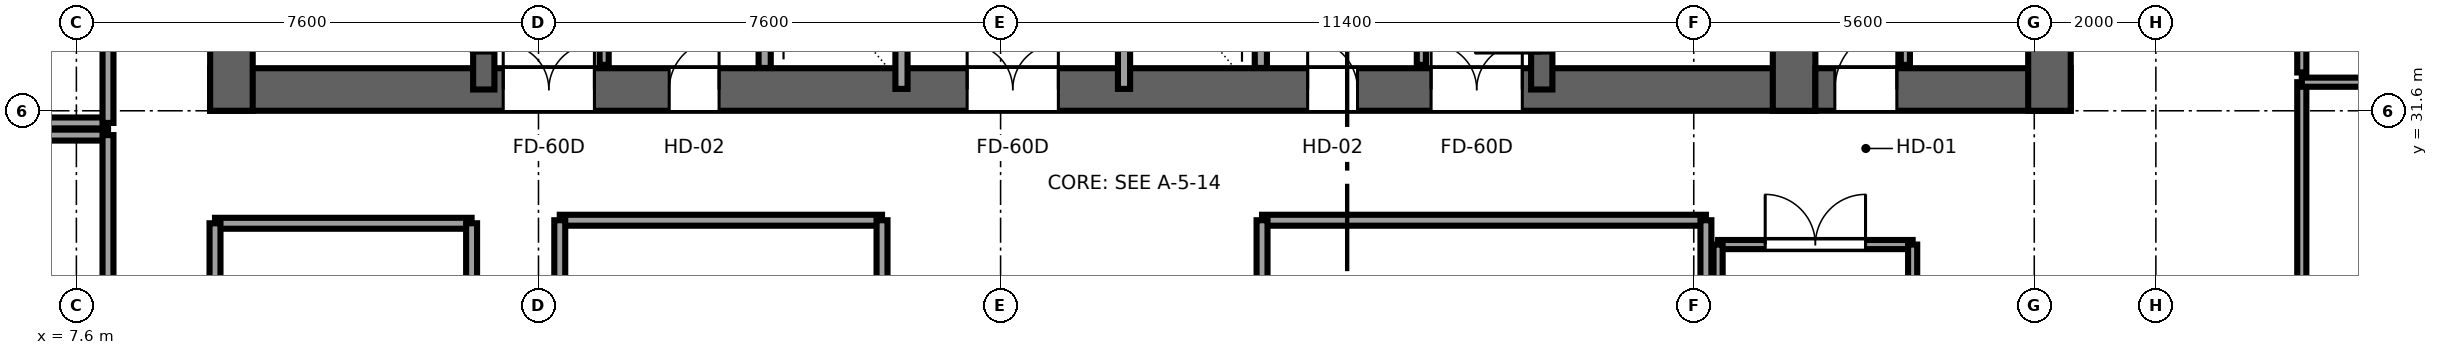
"""IFC4 building model, lengths in metres.
Left out: names, types, materials, properties, quantities, classifications, styles, units other than length and angle.
Written with IfcOpenShell. Run it as: python <this file> out.ifc"""

import sys

from ifc_helpers import new_model, si_unit, direction, frame, frame_2d, origin, place, context, subcontext, project, spatial, rectangle, extrude, source, transform, mapped, element, fill, save


model = new_model("IFC4")
c1 = context("Model", 3, precision=1e-05, world=origin(), true_north=direction((0.0, 1.0)))
c2 = subcontext(c1, "Body", "Model", "MODEL_VIEW")
j1 = project(units=[si_unit("LENGTHUNIT", "METRE"), si_unit("PLANEANGLEUNIT", "RADIAN")], contexts=[c1])
p1 = place(None, origin())
s1 = spatial("IfcSite", under=j1, at=p1, CompositionType="ELEMENT")
p2 = place(p1, origin())
s2 = spatial("IfcBuilding", under=s1, at=p2, CompositionType="ELEMENT")
p3 = place(p2, frame((0.0, 0.0, 201.75)))
s3 = spatial("IfcBuildingStorey", under=s2, at=p3, CompositionType="ELEMENT", Elevation=201.75)
p4 = place(p3, frame((9.8, 31.95, 0.0), z_axis=(0.0, 0.0, 1.0), x_axis=(1.0, 0.0, 0.0)))
e1 = element("IfcWall", 1, at=p4, inside=s3, PredefinedType="SHEAR", context=c2, shape_type="SweptSolid", body=[
    extrude(rectangle(XDim=26.4, YDim=0.7, at=frame_2d((13.2, 0.0))), origin(), (0.0, 0.0, 1.0), 3.55),
])
p5 = place(p4, frame((6.32, 0.0, 0.0), z_axis=(0.0, 0.0, 1.0), x_axis=(-1.0, 0.0, 0.0)))
e2 = element("IfcOpeningElement", 2, at=p5, cuts=e1, PredefinedType="OPENING", context=c2, shape_type="SweptSolid", body=[
    extrude(rectangle(XDim=1.5, YDim=2.04, at=frame_2d((0.75, 1.02))), frame((0.0, 0.36, 0.0), z_axis=(0.0, -1.0, 0.0), x_axis=(1.0, 0.0, 0.0)), (0.0, 0.0, 1.0), 0.72),
])
p6 = place(p4, frame((13.95, 0.0, 0.0), z_axis=(0.0, 0.0, 1.0), x_axis=(-1.0, 0.0, 0.0)))
e3 = element("IfcOpeningElement", 3, at=p6, cuts=e1, PredefinedType="OPENING", context=c2, shape_type="SweptSolid", body=[
    extrude(rectangle(XDim=1.5, YDim=2.04, at=frame_2d((0.75, 1.02))), frame((0.0, 0.36, 0.0), z_axis=(0.0, -1.0, 0.0), x_axis=(1.0, 0.0, 0.0)), (0.0, 0.0, 1.0), 0.72),
])
p7 = place(p4, frame((21.58, 0.0, 0.0), z_axis=(0.0, 0.0, 1.0), x_axis=(-1.0, 0.0, 0.0)))
e4 = element("IfcOpeningElement", 4, at=p7, cuts=e1, PredefinedType="OPENING", context=c2, shape_type="SweptSolid", body=[
    extrude(rectangle(XDim=1.5, YDim=2.04, at=frame_2d((0.75, 1.02))), frame((0.0, 0.36, 0.0), z_axis=(0.0, -1.0, 0.0), x_axis=(1.0, 0.0, 0.0)), (0.0, 0.0, 1.0), 0.72),
])
p8 = place(p4, frame((8.37, 0.0, 0.0), z_axis=(0.0, 0.0, 1.0), x_axis=(-1.0, 0.0, 0.0)))
e5 = element("IfcOpeningElement", 5, at=p8, cuts=e1, PredefinedType="OPENING", context=c2, shape_type="SweptSolid", body=[
    extrude(rectangle(XDim=0.82, YDim=2.01, at=frame_2d((0.41, 1.005))), frame((0.0, 0.36, 0.0), z_axis=(0.0, -1.0, 0.0), x_axis=(1.0, 0.0, 0.0)), (0.0, 0.0, 1.0), 0.72),
])
p9 = place(p4, frame((18.87, 0.0, 0.0), z_axis=(0.0, 0.0, 1.0), x_axis=(-1.0, 0.0, 0.0)))
e6 = element("IfcOpeningElement", 6, at=p9, cuts=e1, PredefinedType="OPENING", context=c2, shape_type="SweptSolid", body=[
    extrude(rectangle(XDim=0.82, YDim=2.01, at=frame_2d((0.41, 1.005))), frame((0.0, 0.36, 0.0), z_axis=(0.0, -1.0, 0.0), x_axis=(1.0, 0.0, 0.0)), (0.0, 0.0, 1.0), 0.72),
])
for number, where, z_axis, x_axis in (
    (7, (10.15, 31.6, 0.0), (0.0, 0.0, 1.0), (0.0, 1.0, 0.0)),
    (8, (35.85, 31.6, 0.0), (0.0, 0.0, 1.0), (0.0, 1.0, 0.0)),
):
    element("IfcWall", number, at=place(p3, frame(where, z_axis=z_axis, x_axis=x_axis)), inside=s3, PredefinedType="SHEAR", context=c2, shape_type="SweptSolid", body=[
        extrude(rectangle(XDim=13.6, YDim=0.7, at=frame_2d((6.8, 0.0))), origin(), (0.0, 0.0, 1.0), 3.55),
    ])
p10 = place(p3, frame((14.3, 31.95, 0.0), z_axis=(0.0, 0.0, 1.0), x_axis=(0.0, 1.0, 0.0)))
e9 = element("IfcWall", 9, at=p10, inside=s3, PredefinedType="SHEAR", context=c2, shape_type="SweptSolid", body=[
    extrude(rectangle(XDim=12.9, YDim=0.35, at=frame_2d((6.45, 0.0))), origin(), (0.0, 0.0, 1.0), 3.55),
])
p11 = place(p10, frame((0.6, 0.0, 0.0)))
e10 = element("IfcOpeningElement", 10, at=p11, cuts=e9, PredefinedType="OPENING", context=c2, shape_type="SweptSolid", body=[
    extrude(rectangle(XDim=1.1, YDim=2.12, at=frame_2d((0.55, 1.06))), frame((0.0, 0.185, 0.0), z_axis=(0.0, -1.0, 0.0), x_axis=(1.0, 0.0, 0.0)), (0.0, 0.0, 1.0), 0.37),
])
p12 = place(p3, frame((31.7, 31.95, 0.0), z_axis=(0.0, 0.0, 1.0), x_axis=(0.0, 1.0, 0.0)))
e11 = element("IfcWall", 11, at=p12, inside=s3, PredefinedType="SHEAR", context=c2, shape_type="SweptSolid", body=[
    extrude(rectangle(XDim=12.9, YDim=0.35, at=frame_2d((6.45, 0.0))), origin(), (0.0, 0.0, 1.0), 3.55),
])
p13 = place(p12, frame((1.7, 0.0, 0.0), z_axis=(0.0, 0.0, 1.0), x_axis=(-1.0, 0.0, 0.0)))
e12 = element("IfcOpeningElement", 12, at=p13, cuts=e11, PredefinedType="OPENING", context=c2, shape_type="SweptSolid", body=[
    extrude(rectangle(XDim=1.1, YDim=2.12, at=frame_2d((0.55, 1.06))), frame((0.0, 0.185, 0.0), z_axis=(0.0, -1.0, 0.0), x_axis=(1.0, 0.0, 0.0)), (0.0, 0.0, 1.0), 0.37),
])
p14 = place(p3, frame((36.2, 31.95, 0.0), z_axis=(0.0, 0.0, 1.0), x_axis=(1.0, 0.0, 0.0)))
e13 = element("IfcWall", 13, at=p14, inside=s3, PredefinedType="SHEAR", context=c2, shape_type="SweptSolid", body=[
    extrude(rectangle(XDim=4.2, YDim=0.7, at=frame_2d((2.1, 0.0))), origin(), (0.0, 0.0, 1.0), 3.55),
])
p15 = place(p14, frame((1.34, 0.0, 0.0), z_axis=(0.0, 0.0, 1.0), x_axis=(-1.0, 0.0, 0.0)))
e14 = element("IfcOpeningElement", 14, at=p15, cuts=e13, PredefinedType="OPENING", context=c2, shape_type="SweptSolid", body=[
    extrude(rectangle(XDim=1.02, YDim=2.03, at=frame_2d((0.51, 1.015))), frame((0.0, 0.36, 0.0), z_axis=(0.0, -1.0, 0.0), x_axis=(1.0, 0.0, 0.0)), (0.0, 0.0, 1.0), 0.72),
])
p16 = place(p3, frame((40.05, 31.6, 0.0), z_axis=(0.0, 0.0, 1.0), x_axis=(0.0, 1.0, 0.0)))
e15 = element("IfcWall", 15, at=p16, inside=s3, PredefinedType="SHEAR", context=c2, shape_type="SweptSolid", body=[
    extrude(rectangle(XDim=13.6, YDim=0.7, at=frame_2d((6.8, 0.0))), origin(), (0.0, 0.0, 1.0), 3.55),
])
for number, where, z_axis, x_axis in (
    (16, (18.92, 32.304, 0.0), (0.0, 0.0, 1.0), (0.0, 1.0, 0.0)),
    (17, (27.08, 32.304, 0.0), (0.0, 0.0, 1.0), (0.0, 1.0, 0.0)),
):
    element("IfcWall", number, at=place(p3, frame(where, z_axis=z_axis, x_axis=x_axis)), inside=s3, PredefinedType="SOLIDWALL", context=c2, shape_type="SweptSolid", body=[
        extrude(rectangle(XDim=3.846, YDim=0.2, at=frame_2d((1.923, 0.0))), origin(), (0.0, 0.0, 1.0), 3.29),
    ])
p17 = place(p3, frame((21.17, 31.96, 0.0), z_axis=(0.0, 0.0, 1.0), x_axis=(0.0, 1.0, 0.0)))
e18 = element("IfcWall", 18, at=p17, inside=s3, PredefinedType="SOLIDWALL", context=c2, shape_type="SweptSolid", body=[
    extrude(rectangle(XDim=12.58, YDim=0.2, at=frame_2d((6.29, 0.0))), origin(), (0.0, 0.0, 1.0), 3.29),
])
p18 = place(p17, frame((5.74, 0.0, 0.0)))
e19 = element("IfcOpeningElement", 19, at=p18, cuts=e18, PredefinedType="OPENING", context=c2, shape_type="SweptSolid", body=[
    extrude(rectangle(XDim=1.1, YDim=2.12, at=frame_2d((0.55, 1.06))), frame((0.0, 0.11, 0.0), z_axis=(0.0, -1.0, 0.0), x_axis=(1.0, 0.0, 0.0)), (0.0, 0.0, 1.0), 0.22),
])
p19 = place(p17, frame((8.24, 0.0, 0.0)))
e20 = element("IfcOpeningElement", 20, at=p19, cuts=e18, PredefinedType="OPENING", context=c2, shape_type="SweptSolid", body=[
    extrude(rectangle(XDim=1.1, YDim=2.12, at=frame_2d((0.55, 1.06))), frame((0.0, 0.11, 0.0), z_axis=(0.0, -1.0, 0.0), x_axis=(1.0, 0.0, 0.0)), (0.0, 0.0, 1.0), 0.22),
])
p20 = place(p3, frame((24.83, 31.96, 0.0), z_axis=(0.0, 0.0, 1.0), x_axis=(0.0, 1.0, 0.0)))
e21 = element("IfcWall", 21, at=p20, inside=s3, PredefinedType="SOLIDWALL", context=c2, shape_type="SweptSolid", body=[
    extrude(rectangle(XDim=12.58, YDim=0.2, at=frame_2d((6.29, 0.0))), origin(), (0.0, 0.0, 1.0), 3.29),
])
p21 = place(p20, frame((5.74, 0.0, 0.0)))
e22 = element("IfcOpeningElement", 22, at=p21, cuts=e21, PredefinedType="OPENING", context=c2, shape_type="SweptSolid", body=[
    extrude(rectangle(XDim=1.1, YDim=2.12, at=frame_2d((0.55, 1.06))), frame((0.0, 0.11, 0.0), z_axis=(0.0, -1.0, 0.0), x_axis=(1.0, 0.0, 0.0)), (0.0, 0.0, 1.0), 0.22),
])
p22 = place(p20, frame((8.24, 0.0, 0.0)))
e23 = element("IfcOpeningElement", 23, at=p22, cuts=e21, PredefinedType="OPENING", context=c2, shape_type="SweptSolid", body=[
    extrude(rectangle(XDim=1.1, YDim=2.12, at=frame_2d((0.55, 1.06))), frame((0.0, 0.11, 0.0), z_axis=(0.0, -1.0, 0.0), x_axis=(1.0, 0.0, 0.0)), (0.0, 0.0, 1.0), 0.22),
])
for number, where, z_axis, x_axis in (
    (24, (16.28, 32.355, 0.0), (0.0, 0.0, 1.0), (0.0, 1.0, 0.0)),
    (25, (29.72, 32.355, 0.0), (0.0, 0.0, 1.0), (0.0, 1.0, 0.0)),
):
    element("IfcWall", number, at=place(p3, frame(where, z_axis=z_axis, x_axis=x_axis)), inside=s3, PredefinedType="PARTITIONING", context=c2, shape_type="SweptSolid", body=[
        extrude(rectangle(XDim=0.865, YDim=0.15, at=frame_2d((0.433, 0.0))), origin(), (0.0, 0.0, 1.0), 3.29),
    ])
p23 = place(p3, frame((37.68, 32.355, 0.0), z_axis=(0.0, 0.0, 1.0), x_axis=(0.0, 1.0, 0.0)))
e26 = element("IfcWall", 26, at=p23, inside=s3, PredefinedType="PARTITIONING", context=c2, shape_type="SweptSolid", body=[
    extrude(rectangle(XDim=7.845, YDim=0.15, at=frame_2d((3.922, 0.0))), origin(), (0.0, 0.0, 1.0), 3.29),
])
p24 = place(p23, frame((3.413, 0.0, 0.0)))
e27 = element("IfcOpeningElement", 27, at=p24, cuts=e26, PredefinedType="OPENING", context=c2, shape_type="SweptSolid", body=[
    extrude(rectangle(XDim=1.02, YDim=2.03, at=frame_2d((0.51, 1.015))), frame((0.0, 0.085, 0.0), z_axis=(0.0, -1.0, 0.0), x_axis=(1.0, 0.0, 0.0)), (0.0, 0.0, 1.0), 0.17),
])
p25 = place(p3, frame((3.005, 31.2, 0.0), z_axis=(0.0, 0.0, 1.0), x_axis=(1.0, 0.0, 0.0)))
e28 = element("IfcWall", 28, at=p25, inside=s3, PredefinedType="PARTITIONING", context=c2, shape_type="SweptSolid", body=[
    extrude(rectangle(XDim=5.115, YDim=0.18, at=frame_2d((2.558, 0.0))), origin(), (0.0, 0.0, 1.0), 3.29),
])
p26 = place(p3, frame((8.12, 23.7, 0.0), z_axis=(0.0, 0.0, 1.0), x_axis=(0.0, 1.0, 0.0)))
e29 = element("IfcWall", 29, at=p26, inside=s3, PredefinedType="PARTITIONING", context=c2, shape_type="SweptSolid", body=[
    extrude(rectangle(XDim=7.5, YDim=0.18, at=frame_2d((3.75, 0.0))), origin(), (0.0, 0.0, 1.0), 3.29),
])
p27 = place(p26, frame((2.925, 0.0, 0.0)))
e30 = element("IfcOpeningElement", 30, at=p27, cuts=e29, PredefinedType="OPENING", context=c2, shape_type="SweptSolid", body=[
    extrude(rectangle(XDim=1.65, YDim=2.15, at=frame_2d((0.825, 1.075))), frame((0.0, 0.1, 0.0), z_axis=(0.0, -1.0, 0.0), x_axis=(1.0, 0.0, 0.0)), (0.0, 0.0, 1.0), 0.2),
])
p28 = place(p3, frame((3.005, 31.4, 0.0), z_axis=(0.0, 0.0, 1.0), x_axis=(1.0, 0.0, 0.0)))
e31 = element("IfcWall", 31, at=p28, inside=s3, PredefinedType="PARTITIONING", context=c2, shape_type="SweptSolid", body=[
    extrude(rectangle(XDim=5.115, YDim=0.18, at=frame_2d((2.558, 0.0))), origin(), (0.0, 0.0, 1.0), 3.29),
])
p29 = place(p3, frame((8.12, 31.4, 0.0), z_axis=(0.0, 0.0, 1.0), x_axis=(0.0, 1.0, 0.0)))
e32 = element("IfcWall", 32, at=p29, inside=s3, PredefinedType="PARTITIONING", context=c2, shape_type="SweptSolid", body=[
    extrude(rectangle(XDim=6.8, YDim=0.18, at=frame_2d((3.4, 0.0))), origin(), (0.0, 0.0, 1.0), 3.29),
])
p30 = place(p29, frame((3.175, 0.0, 0.0)))
e33 = element("IfcOpeningElement", 33, at=p30, cuts=e32, PredefinedType="OPENING", context=c2, shape_type="SweptSolid", body=[
    extrude(rectangle(XDim=1.65, YDim=2.15, at=frame_2d((0.825, 1.075))), frame((0.0, 0.1, 0.0), z_axis=(0.0, -1.0, 0.0), x_axis=(1.0, 0.0, 0.0)), (0.0, 0.0, 1.0), 0.2),
])
p31 = place(p3, frame((44.2, 23.78, 0.0), z_axis=(0.0, 0.0, 1.0), x_axis=(0.0, 1.0, 0.0)))
e34 = element("IfcWall", 34, at=p31, inside=s3, PredefinedType="PARTITIONING", context=c2, shape_type="SweptSolid", body=[
    extrude(rectangle(XDim=8.29, YDim=0.15, at=frame_2d((4.145, 0.0))), origin(), (0.0, 0.0, 1.0), 3.29),
])
p32 = place(p31, frame((3.655, 0.0, 0.0)))
e35 = element("IfcOpeningElement", 35, at=p32, cuts=e34, PredefinedType="OPENING", context=c2, shape_type="SweptSolid", body=[
    extrude(rectangle(XDim=0.98, YDim=2.12, at=frame_2d((0.49, 1.06))), frame((0.0, 0.085, 0.0), z_axis=(0.0, -1.0, 0.0), x_axis=(1.0, 0.0, 0.0)), (0.0, 0.0, 1.0), 0.17),
])
p33 = place(p3, frame((44.2, 32.07, 0.0), z_axis=(0.0, 0.0, 1.0), x_axis=(1.0, 0.0, 0.0)))
e36 = element("IfcWall", 36, at=p33, inside=s3, PredefinedType="PARTITIONING", context=c2, shape_type="SweptSolid", body=[
    extrude(rectangle(XDim=7.43, YDim=0.15, at=frame_2d((3.715, 0.0))), origin(), (0.0, 0.0, 1.0), 3.29),
])
p34 = place(p3, frame((44.2, 32.23, 0.0), z_axis=(0.0, 0.0, 1.0), x_axis=(0.0, 1.0, 0.0)))
e37 = element("IfcWall", 37, at=p34, inside=s3, PredefinedType="PARTITIONING", context=c2, shape_type="SweptSolid", body=[
    extrude(rectangle(XDim=8.29, YDim=0.15, at=frame_2d((4.145, 0.0))), origin(), (0.0, 0.0, 1.0), 3.29),
])
p35 = place(p34, frame((3.655, 0.0, 0.0)))
e38 = element("IfcOpeningElement", 38, at=p35, cuts=e37, PredefinedType="OPENING", context=c2, shape_type="SweptSolid", body=[
    extrude(rectangle(XDim=0.98, YDim=2.12, at=frame_2d((0.49, 1.06))), frame((0.0, 0.085, 0.0), z_axis=(0.0, -1.0, 0.0), x_axis=(1.0, 0.0, 0.0)), (0.0, 0.0, 1.0), 0.17),
])
p36 = place(p3, frame((9.88, 29.75, 0.0), z_axis=(0.0, 0.0, 1.0), x_axis=(1.0, 0.0, 0.0)))
e39 = element("IfcWall", 39, at=p36, inside=s3, PredefinedType="PARTITIONING", context=c2, shape_type="SweptSolid", body=[
    extrude(rectangle(XDim=4.22, YDim=0.18, at=frame_2d((2.11, 0.0))), origin(), (0.0, 0.0, 1.0), 3.29),
])
for number, where, z_axis, x_axis in (
    (40, (9.88, 23.7, 0.0), (0.0, 0.0, 1.0), (0.0, 1.0, 0.0)),
    (41, (14.1, 23.7, 0.0), (0.0, 0.0, 1.0), (0.0, 1.0, 0.0)),
):
    element("IfcWall", number, at=place(p3, frame(where, z_axis=z_axis, x_axis=x_axis)), inside=s3, PredefinedType="PARTITIONING", context=c2, shape_type="SweptSolid", body=[
        extrude(rectangle(XDim=6.05, YDim=0.18, at=frame_2d((3.025, 0.0))), origin(), (0.0, 0.0, 1.0), 3.29),
    ])
p37 = place(p3, frame((27.1, 29.8, 0.0), z_axis=(0.0, 0.0, 1.0), x_axis=(1.0, 0.0, 0.0)))
e42 = element("IfcWall", 42, at=p37, inside=s3, PredefinedType="PARTITIONING", context=c2, shape_type="SweptSolid", body=[
    extrude(rectangle(XDim=7.3, YDim=0.18, at=frame_2d((3.65, 0.0))), origin(), (0.0, 0.0, 1.0), 3.29),
])
for number, where, z_axis, x_axis in (
    (43, (27.1, 23.7, 0.0), (0.0, 0.0, 1.0), (0.0, 1.0, 0.0)),
    (44, (34.4, 23.7, 0.0), (0.0, 0.0, 1.0), (0.0, 1.0, 0.0)),
):
    element("IfcWall", number, at=place(p3, frame(where, z_axis=z_axis, x_axis=x_axis)), inside=s3, PredefinedType="PARTITIONING", context=c2, shape_type="SweptSolid", body=[
        extrude(rectangle(XDim=6.1, YDim=0.18, at=frame_2d((3.05, 0.0))), origin(), (0.0, 0.0, 1.0), 3.29),
    ])
p38 = place(p3, frame((15.55, 29.8, 0.0), z_axis=(0.0, 0.0, 1.0), x_axis=(1.0, 0.0, 0.0)))
e45 = element("IfcWall", 45, at=p38, inside=s3, PredefinedType="PARTITIONING", context=c2, shape_type="SweptSolid", body=[
    extrude(rectangle(XDim=5.3, YDim=0.18, at=frame_2d((2.65, 0.0))), origin(), (0.0, 0.0, 1.0), 3.29),
])
for number, where, z_axis, x_axis in (
    (46, (15.55, 23.7, 0.0), (0.0, 0.0, 1.0), (0.0, 1.0, 0.0)),
    (47, (20.85, 23.7, 0.0), (0.0, 0.0, 1.0), (0.0, 1.0, 0.0)),
):
    element("IfcWall", number, at=place(p3, frame(where, z_axis=z_axis, x_axis=x_axis)), inside=s3, PredefinedType="PARTITIONING", context=c2, shape_type="SweptSolid", body=[
        extrude(rectangle(XDim=6.1, YDim=0.18, at=frame_2d((3.05, 0.0))), origin(), (0.0, 0.0, 1.0), 3.29),
    ])
p39 = place(p3, frame((34.6, 29.4, 0.0), z_axis=(0.0, 0.0, 1.0), x_axis=(1.0, 0.0, 0.0)))
e48 = element("IfcWall", 48, at=p39, inside=s3, PredefinedType="PARTITIONING", context=c2, shape_type="SweptSolid", body=[
    extrude(rectangle(XDim=3.2, YDim=0.15, at=frame_2d((1.6, 0.0))), origin(), (0.0, 0.0, 1.0), 3.29),
])
p40 = place(p39, frame((0.775, 0.0, 0.0)))
e49 = element("IfcOpeningElement", 49, at=p40, cuts=e48, PredefinedType="OPENING", context=c2, shape_type="SweptSolid", body=[
    extrude(rectangle(XDim=1.65, YDim=2.15, at=frame_2d((0.825, 1.075))), frame((0.0, 0.085, 0.0), z_axis=(0.0, -1.0, 0.0), x_axis=(1.0, 0.0, 0.0)), (0.0, 0.0, 1.0), 0.17),
])
for number, where, z_axis, x_axis in (
    (50, (34.6, 23.7, 0.0), (0.0, 0.0, 1.0), (0.0, 1.0, 0.0)),
    (51, (37.8, 23.7, 0.0), (0.0, 0.0, 1.0), (0.0, 1.0, 0.0)),
):
    element("IfcWall", number, at=place(p3, frame(where, z_axis=z_axis, x_axis=x_axis)), inside=s3, PredefinedType="PARTITIONING", context=c2, shape_type="SweptSolid", body=[
        extrude(rectangle(XDim=5.7, YDim=0.15, at=frame_2d((2.85, 0.0))), origin(), (0.0, 0.0, 1.0), 3.29),
    ])
m1 = source(origin(), c2, "Body", "SweptSolid", [
    extrude(rectangle(XDim=1.1, YDim=2.12, at=frame_2d((0.55, 1.06))), frame((0.0, 0.025, 0.0), z_axis=(0.0, -1.0, 0.0), x_axis=(1.0, 0.0, 0.0)), (0.0, 0.0, 1.0), 0.05),
])
p41 = place(p11, origin())
e52 = element("IfcDoor", 52, at=p41, inside=s3, OperationType="SINGLE_SWING_RIGHT", PredefinedType="DOOR", context=c2, shape_type="MappedRepresentation", body=[
    mapped(m1, transform((0.0, 0.0, 0.0), x_axis=(1.0, 0.0, 0.0), y_axis=(0.0, 1.0, 0.0), z_axis=(0.0, 0.0, 1.0), scale=1.0)),
])
fill(e10, e52)
p42 = place(p13, origin())
e53 = element("IfcDoor", 53, at=p42, inside=s3, OperationType="SINGLE_SWING_LEFT", PredefinedType="DOOR", context=c2, shape_type="MappedRepresentation", body=[
    mapped(m1, transform((0.0, 0.0, 0.0), x_axis=(1.0, 0.0, 0.0), y_axis=(0.0, 1.0, 0.0), z_axis=(0.0, 0.0, 1.0), scale=1.0)),
])
fill(e12, e53)
m2 = source(origin(), c2, "Body", "SweptSolid", [
    extrude(rectangle(XDim=1.5, YDim=2.04, at=frame_2d((0.75, 1.02))), frame((0.0, 0.025, 0.0), z_axis=(0.0, -1.0, 0.0), x_axis=(1.0, 0.0, 0.0)), (0.0, 0.0, 1.0), 0.05),
])
p43 = place(p5, origin())
e54 = element("IfcDoor", 54, at=p43, inside=s3, OperationType="DOUBLE_DOOR_SINGLE_SWING", PredefinedType="DOOR", context=c2, shape_type="MappedRepresentation", body=[
    mapped(m2, transform((0.0, 0.0, 0.0), x_axis=(1.0, 0.0, 0.0), y_axis=(0.0, 1.0, 0.0), z_axis=(0.0, 0.0, 1.0), scale=1.0)),
])
fill(e2, e54)
p44 = place(p6, origin())
e55 = element("IfcDoor", 55, at=p44, inside=s3, OperationType="DOUBLE_DOOR_SINGLE_SWING", PredefinedType="DOOR", context=c2, shape_type="MappedRepresentation", body=[
    mapped(m2, transform((0.0, 0.0, 0.0), x_axis=(1.0, 0.0, 0.0), y_axis=(0.0, 1.0, 0.0), z_axis=(0.0, 0.0, 1.0), scale=1.0)),
])
fill(e3, e55)
p45 = place(p7, origin())
e56 = element("IfcDoor", 56, at=p45, inside=s3, OperationType="DOUBLE_DOOR_SINGLE_SWING", PredefinedType="DOOR", context=c2, shape_type="MappedRepresentation", body=[
    mapped(m2, transform((0.0, 0.0, 0.0), x_axis=(1.0, 0.0, 0.0), y_axis=(0.0, 1.0, 0.0), z_axis=(0.0, 0.0, 1.0), scale=1.0)),
])
fill(e4, e56)
m3 = source(origin(), c2, "Body", "SweptSolid", [
    extrude(rectangle(XDim=0.82, YDim=2.01, at=frame_2d((0.41, 1.005))), frame((0.0, 0.025, 0.0), z_axis=(0.0, -1.0, 0.0), x_axis=(1.0, 0.0, 0.0)), (0.0, 0.0, 1.0), 0.05),
])
p46 = place(p8, origin())
e57 = element("IfcDoor", 57, at=p46, inside=s3, OperationType="SINGLE_SWING_RIGHT", PredefinedType="DOOR", context=c2, shape_type="MappedRepresentation", body=[
    mapped(m3, transform((0.0, 0.0, 0.0), x_axis=(1.0, 0.0, 0.0), y_axis=(0.0, 1.0, 0.0), z_axis=(0.0, 0.0, 1.0), scale=1.0)),
])
fill(e5, e57)
p47 = place(p9, origin())
e58 = element("IfcDoor", 58, at=p47, inside=s3, OperationType="SINGLE_SWING_LEFT", PredefinedType="DOOR", context=c2, shape_type="MappedRepresentation", body=[
    mapped(m3, transform((0.0, 0.0, 0.0), x_axis=(1.0, 0.0, 0.0), y_axis=(0.0, 1.0, 0.0), z_axis=(0.0, 0.0, 1.0), scale=1.0)),
])
fill(e6, e58)
m4 = source(origin(), c2, "Body", "SweptSolid", [
    extrude(rectangle(XDim=1.02, YDim=2.03, at=frame_2d((0.51, 1.015))), frame((0.0, 0.025, 0.0), z_axis=(0.0, -1.0, 0.0), x_axis=(1.0, 0.0, 0.0)), (0.0, 0.0, 1.0), 0.05),
])
p48 = place(p15, origin())
e59 = element("IfcDoor", 59, at=p48, inside=s3, OperationType="SINGLE_SWING_RIGHT", PredefinedType="DOOR", context=c2, shape_type="MappedRepresentation", body=[
    mapped(m4, transform((0.0, 0.0, 0.0), x_axis=(1.0, 0.0, 0.0), y_axis=(0.0, 1.0, 0.0), z_axis=(0.0, 0.0, 1.0), scale=1.0)),
])
fill(e14, e59)
m5 = source(origin(), c2, "Body", "SweptSolid", [
    extrude(rectangle(XDim=1.65, YDim=2.15, at=frame_2d((0.825, 1.075))), frame((0.0, 0.025, 0.0), z_axis=(0.0, -1.0, 0.0), x_axis=(1.0, 0.0, 0.0)), (0.0, 0.0, 1.0), 0.05),
])
p49 = place(p40, origin())
e60 = element("IfcDoor", 60, at=p49, inside=s3, OperationType="DOUBLE_DOOR_SINGLE_SWING", PredefinedType="DOOR", context=c2, shape_type="MappedRepresentation", body=[
    mapped(m5, transform((0.0, 0.0, 0.0), x_axis=(1.0, 0.0, 0.0), y_axis=(0.0, 1.0, 0.0), z_axis=(0.0, 0.0, 1.0), scale=1.0)),
])
fill(e49, e60)
save(model, sys.argv[1])
